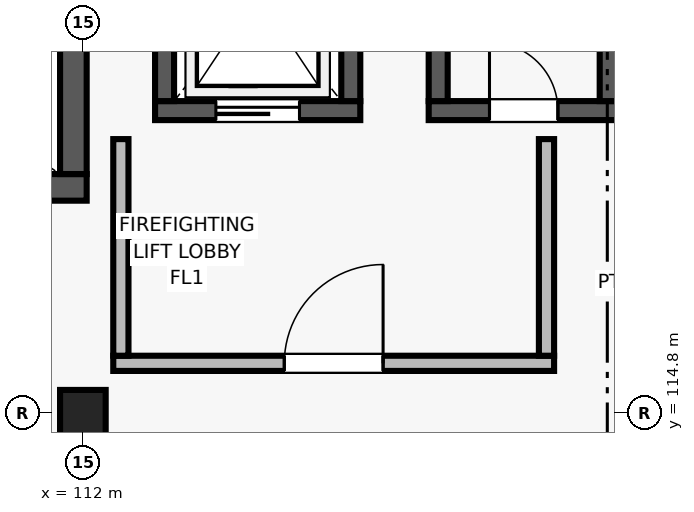
"""IFC4 building model, lengths in metres.
Left out: names, types, materials, properties, quantities, classifications, styles, units other than length and angle.
Written with IfcOpenShell. Run it as: python <this file> out.ifc"""

import sys

from ifc_helpers import new_model, si_unit, direction, frame, frame_2d, origin, origin_2d, place, context, subcontext, project, spatial, rectangle, extrude, element, fill, save


model = new_model("IFC4")
c1 = context("Model", 3, precision=1e-05, world=origin(), true_north=direction((0.0, 1.0)))
c2 = subcontext(c1, "Body", "Model", "MODEL_VIEW")
j1 = project(units=[si_unit("LENGTHUNIT", "METRE"), si_unit("PLANEANGLEUNIT", "RADIAN")], contexts=[c1])
p1 = place(None, origin())
s1 = spatial("IfcSite", under=j1, at=p1, CompositionType="ELEMENT")
p2 = place(p1, origin())
s2 = spatial("IfcBuilding", under=s1, at=p2, CompositionType="ELEMENT")
p3 = place(p2, frame((0.0, 0.0, 17.4)))
s3 = spatial("IfcBuildingStorey", under=s2, at=p3, CompositionType="ELEMENT", Elevation=17.4)
p4 = place(p3, frame((112.0, 114.8, 0.0), z_axis=(0.0, 0.0, 1.0), x_axis=(1.0, 0.0, 0.0)))
e1 = element("IfcColumn", 1, at=p4, inside=s3, PredefinedType="COLUMN", context=c2, shape_type="SweptSolid", body=[
    extrude(rectangle(XDim=0.6, YDim=0.6, at=origin_2d()), origin(), (0.0, 0.0, 1.0), 4.2),
])
p5 = place(p3, frame((103.95, 117.765, 0.0), z_axis=(0.0, 0.0, 1.0), x_axis=(1.0, 0.0, 0.0)))
e2 = element("IfcWall", 2, at=p5, inside=s3, PredefinedType="SHEAR", context=c2, shape_type="SweptSolid", body=[
    extrude(rectangle(XDim=8.1, YDim=0.35, at=frame_2d((4.05, 0.0))), origin(), (0.0, 0.0, 1.0), 3.92),
])
p6 = place(p5, frame((0.6, 0.0, 0.0)))
e3 = element("IfcOpeningElement", 3, at=p6, cuts=e2, PredefinedType="OPENING", context=c2, shape_type="SweptSolid", body=[
    extrude(rectangle(XDim=1.25, YDim=2.2, at=frame_2d((0.625, 1.1))), frame((0.0, 0.185, 0.0), z_axis=(0.0, -1.0, 0.0), x_axis=(1.0, 0.0, 0.0)), (0.0, 0.0, 1.0), 0.37),
])
p7 = place(p3, frame((111.875, 117.94, 0.0), z_axis=(0.0, 0.0, 1.0), x_axis=(0.0, 1.0, 0.0)))
e4 = element("IfcWall", 4, at=p7, inside=s3, PredefinedType="SHEAR", context=c2, shape_type="SweptSolid", body=[
    extrude(rectangle(XDim=3.76, YDim=0.35, at=frame_2d((1.88, 0.0))), origin(), (0.0, 0.0, 1.0), 3.92),
])
p8 = place(p3, frame((112.95, 118.775, 0.0), z_axis=(0.0, 0.0, 1.0), x_axis=(1.0, 0.0, 0.0)))
e5 = element("IfcWall", 5, at=p8, inside=s3, PredefinedType="SHEAR", context=c2, shape_type="SweptSolid", body=[
    extrude(rectangle(XDim=2.7, YDim=0.25, at=frame_2d((1.35, 0.0))), origin(), (0.0, 0.0, 1.0), 3.92),
])
p9 = place(p8, frame((0.8, 0.0, 0.0)))
e6 = element("IfcOpeningElement", 6, at=p9, cuts=e5, PredefinedType="OPENING", context=c2, shape_type="SweptSolid", body=[
    extrude(rectangle(XDim=1.1, YDim=2.15, at=frame_2d((0.55, 1.075))), frame((0.0, 0.135, 0.0), z_axis=(0.0, -1.0, 0.0), x_axis=(1.0, 0.0, 0.0)), (0.0, 0.0, 1.0), 0.27),
])
for number, where, z_axis, x_axis in (
    (7, (113.075, 118.9, 0.0), (0.0, 0.0, 1.0), (0.0, 1.0, 0.0)),
    (8, (115.525, 118.9, 0.0), (0.0, 0.0, 1.0), (0.0, 1.0, 0.0)),
):
    element("IfcWall", number, at=place(p3, frame(where, z_axis=z_axis, x_axis=x_axis)), inside=s3, PredefinedType="SHEAR", context=c2, shape_type="SweptSolid", body=[
        extrude(rectangle(XDim=2.8, YDim=0.25, at=frame_2d((1.4, 0.0))), origin(), (0.0, 0.0, 1.0), 3.92),
    ])
p10 = place(p3, frame((112.4, 115.45, 0.0), z_axis=(0.0, 0.0, 1.0), x_axis=(1.0, 0.0, 0.0)))
e9 = element("IfcWall", 9, at=p10, inside=s3, PredefinedType="SOLIDWALL", context=c2, shape_type="SweptSolid", body=[
    extrude(rectangle(XDim=5.8, YDim=0.2, at=frame_2d((2.9, 0.0))), origin(), (0.0, 0.0, 1.0), 3.92),
])
p11 = place(p10, frame((2.25, 0.0, 0.0)))
e10 = element("IfcOpeningElement", 10, at=p11, cuts=e9, PredefinedType="OPENING", context=c2, shape_type="SweptSolid", body=[
    extrude(rectangle(XDim=1.3, YDim=2.2, at=frame_2d((0.65, 1.1))), frame((0.0, 0.11, 0.0), z_axis=(0.0, -1.0, 0.0), x_axis=(1.0, 0.0, 0.0)), (0.0, 0.0, 1.0), 0.22),
])
for number, where, z_axis, x_axis in (
    (11, (112.5, 115.55, 0.0), (0.0, 0.0, 1.0), (0.0, 1.0, 0.0)),
    (12, (118.1, 115.55, 0.0), (0.0, 0.0, 1.0), (0.0, 1.0, 0.0)),
):
    element("IfcWall", number, at=place(p3, frame(where, z_axis=z_axis, x_axis=x_axis)), inside=s3, PredefinedType="SOLIDWALL", context=c2, shape_type="SweptSolid", body=[
        extrude(rectangle(XDim=2.85, YDim=0.2, at=frame_2d((1.425, 0.0))), origin(), (0.0, 0.0, 1.0), 3.92),
    ])
p12 = place(p3, frame((116.55, 118.775, 0.0), z_axis=(0.0, 0.0, 1.0), x_axis=(1.0, 0.0, 0.0)))
e13 = element("IfcWall", 13, at=p12, inside=s3, PredefinedType="SHEAR", context=c2, shape_type="SweptSolid", body=[
    extrude(rectangle(XDim=2.5, YDim=0.25, at=frame_2d((1.25, 0.0))), origin(), (0.0, 0.0, 1.0), 3.92),
])
p13 = place(p12, frame((0.8, 0.0, 0.0)))
e14 = element("IfcOpeningElement", 14, at=p13, cuts=e13, PredefinedType="OPENING", context=c2, shape_type="SweptSolid", body=[
    extrude(rectangle(XDim=0.9, YDim=2.05, at=frame_2d((0.45, 1.025))), frame((0.0, 0.135, 0.0), z_axis=(0.0, -1.0, 0.0), x_axis=(1.0, 0.0, 0.0)), (0.0, 0.0, 1.0), 0.27),
])
for number, where, z_axis, x_axis in (
    (15, (116.675, 118.9, 0.0), (0.0, 0.0, 1.0), (0.0, 1.0, 0.0)),
    (16, (118.925, 118.9, 0.0), (0.0, 0.0, 1.0), (0.0, 1.0, 0.0)),
):
    element("IfcWall", number, at=place(p3, frame(where, z_axis=z_axis, x_axis=x_axis)), inside=s3, PredefinedType="SHEAR", context=c2, shape_type="SweptSolid", body=[
        extrude(rectangle(XDim=2.8, YDim=0.25, at=frame_2d((1.4, 0.0))), origin(), (0.0, 0.0, 1.0), 3.92),
    ])
p14 = place(p11, origin())
e17 = element("IfcDoor", 17, at=p14, inside=s3, OperationType="SINGLE_SWING_RIGHT", PredefinedType="DOOR", context=c2, shape_type="SweptSolid", body=[
    extrude(rectangle(XDim=1.3, YDim=2.2, at=frame_2d((0.65, 1.1))), frame((0.0, 0.025, 0.0), z_axis=(0.0, -1.0, 0.0), x_axis=(1.0, 0.0, 0.0)), (0.0, 0.0, 1.0), 0.05),
])
fill(e10, e17)
p15 = place(p13, origin())
e18 = element("IfcDoor", 18, at=p15, inside=s3, OperationType="SINGLE_SWING_LEFT", PredefinedType="DOOR", context=c2, shape_type="SweptSolid", body=[
    extrude(rectangle(XDim=0.9, YDim=2.05, at=frame_2d((0.45, 1.025))), frame((0.0, 0.025, 0.0), z_axis=(0.0, -1.0, 0.0), x_axis=(1.0, 0.0, 0.0)), (0.0, 0.0, 1.0), 0.05),
])
fill(e14, e18)
p16 = place(p9, origin())
e19 = element("IfcDoor", 19, at=p16, inside=s3, OperationType="SLIDING_TO_LEFT", PredefinedType="DOOR", context=c2, shape_type="SweptSolid", body=[
    extrude(rectangle(XDim=1.1, YDim=2.15, at=frame_2d((0.55, 1.075))), frame((0.0, 0.025, 0.0), z_axis=(0.0, -1.0, 0.0), x_axis=(1.0, 0.0, 0.0)), (0.0, 0.0, 1.0), 0.05),
])
fill(e6, e19)
save(model, sys.argv[1])
